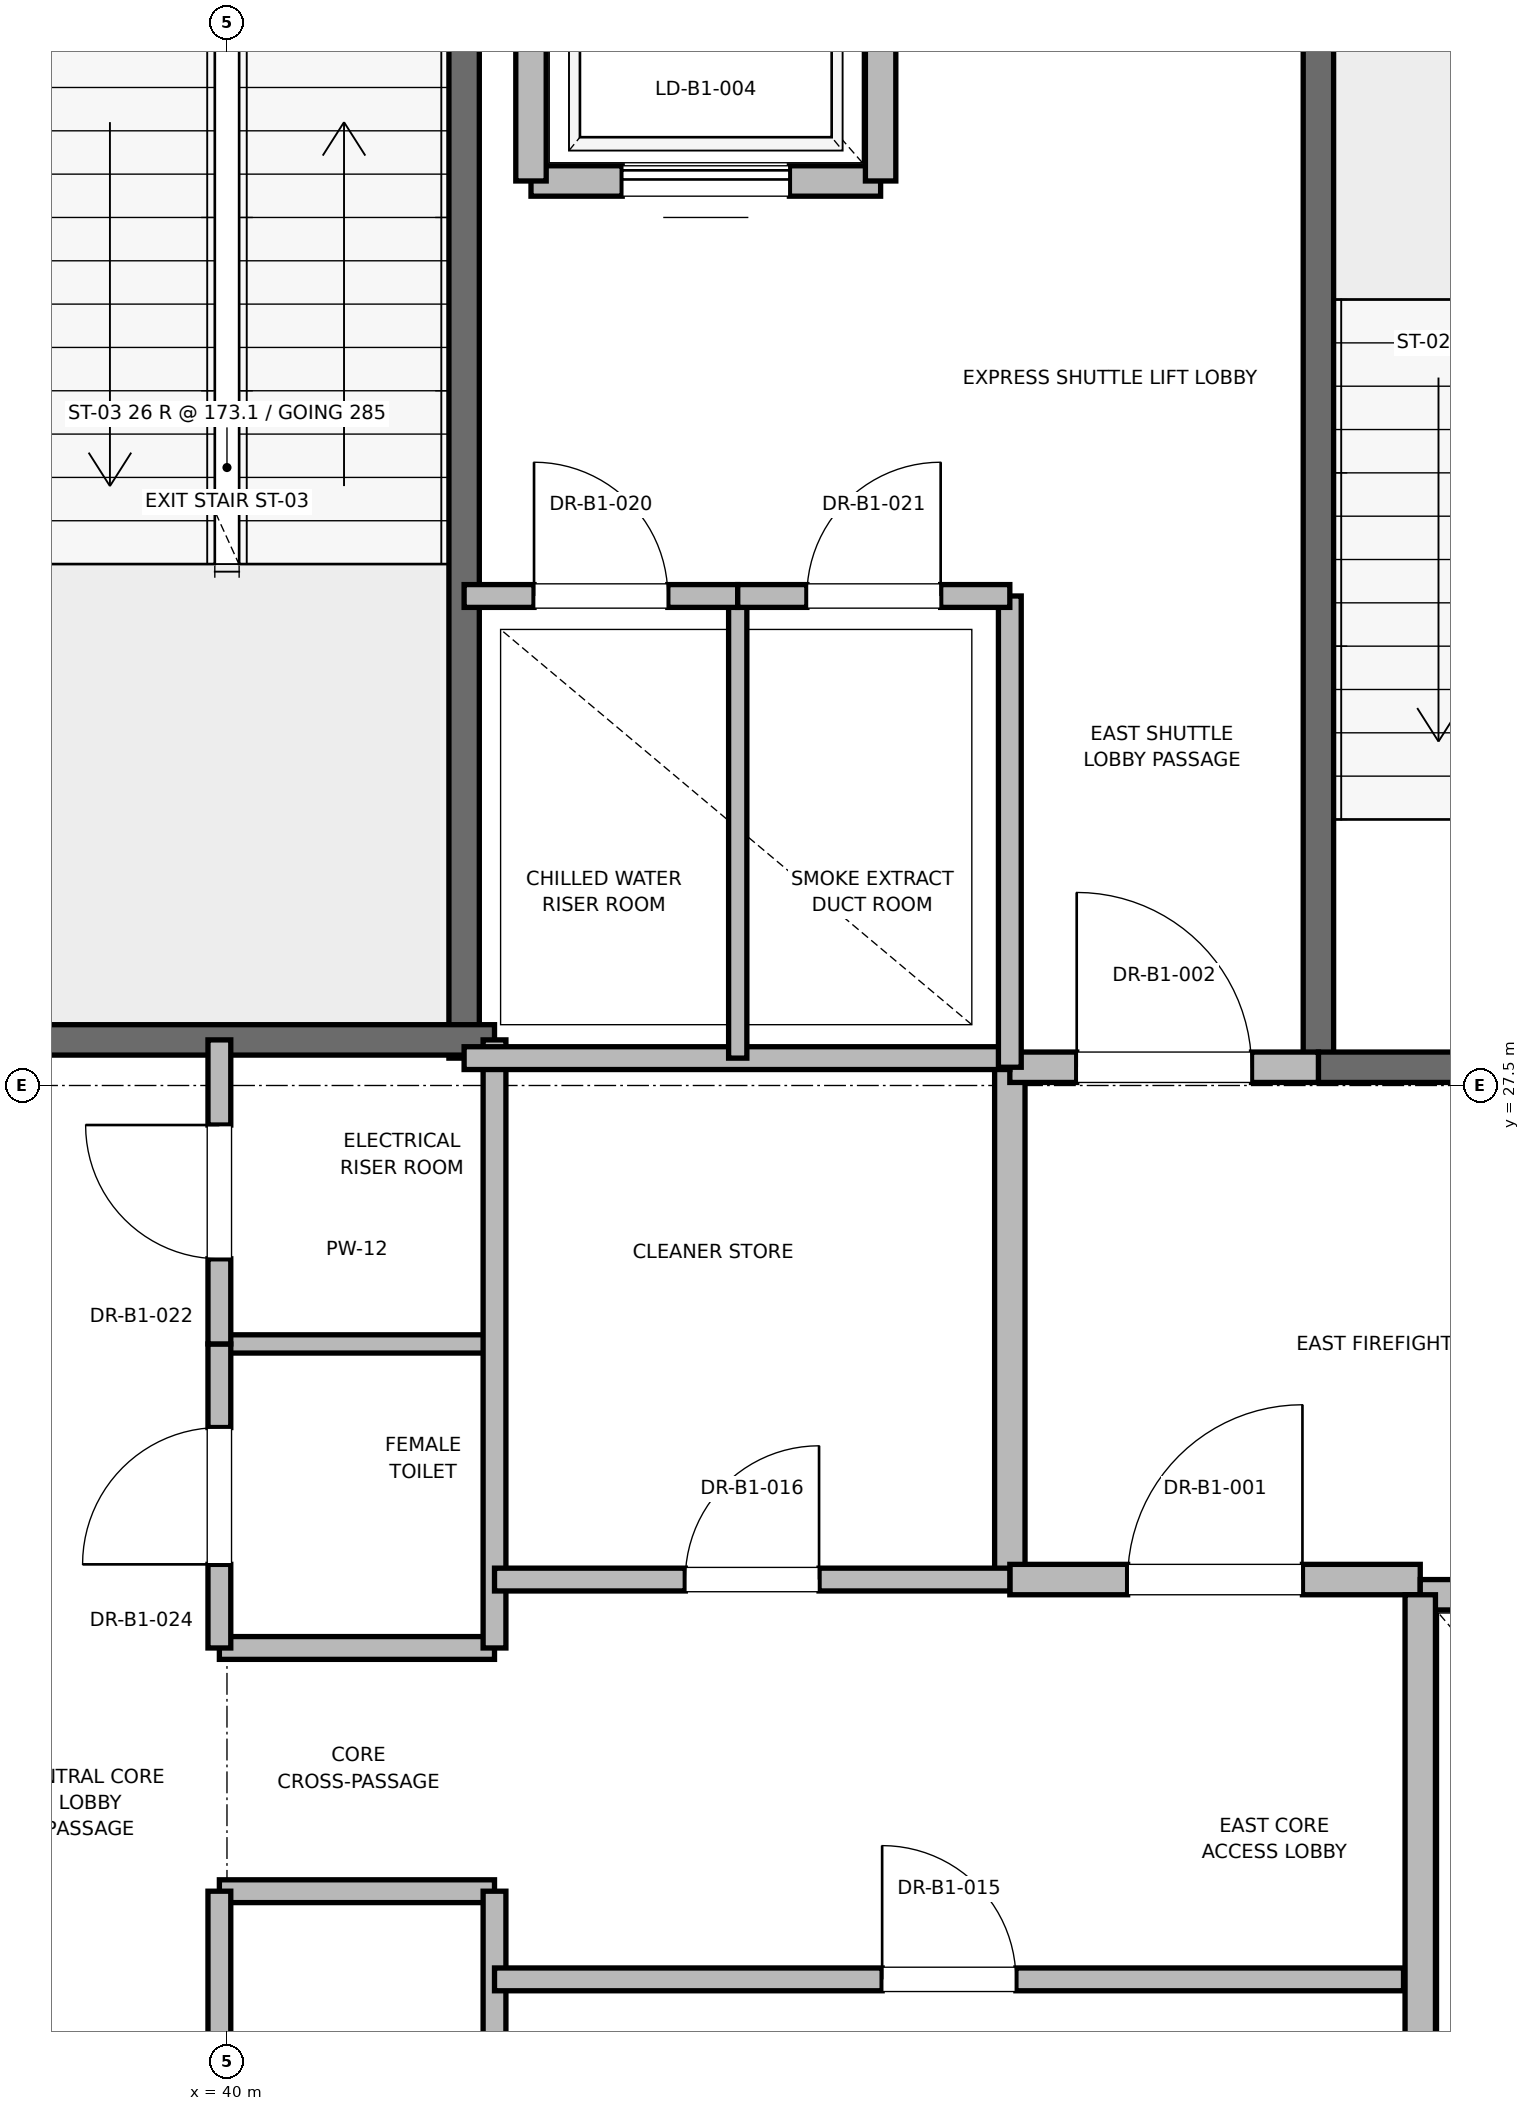
"""IFC4 building model, lengths in metres.
Left out: names, types, materials, properties, quantities, classifications, styles, units other than length and angle.
Written with IfcOpenShell. Run it as: python <this file> out.ifc"""

import sys

from ifc_helpers import new_model, si_unit, direction, frame, frame_2d, origin, place, context, subcontext, project, spatial, rectangle, extrude, element, fill, save


model = new_model("IFC4")
c1 = context("Model", 3, precision=1e-05, world=origin(), true_north=direction((0.0, 1.0)))
c2 = subcontext(c1, "Body", "Model", "MODEL_VIEW")
j1 = project(units=[si_unit("LENGTHUNIT", "METRE"), si_unit("PLANEANGLEUNIT", "RADIAN")], contexts=[c1])
p1 = place(None, origin())
s1 = spatial("IfcSite", under=j1, at=p1, CompositionType="ELEMENT")
p2 = place(p1, origin())
s2 = spatial("IfcBuilding", under=s1, at=p2, CompositionType="ELEMENT")
p3 = place(p2, frame((0.0, 0.0, -4.5)))
s3 = spatial("IfcBuildingStorey", under=s2, at=p3, CompositionType="ELEMENT", Elevation=-4.5)
p4 = place(p3, frame((47.18, 27.62, 0.0), z_axis=(0.0, 0.0, 1.0), x_axis=(0.0, 1.0, 0.0)))
e1 = element("IfcWall", 1, at=p4, inside=s3, PredefinedType="SOLIDWALL", context=c2, shape_type="SweptSolid", body=[
    extrude(rectangle(XDim=8.18, YDim=0.2, at=frame_2d((4.09, 0.0))), origin(), (0.0, 0.0, 1.0), 4.22),
])
p5 = place(p3, frame((47.18, 27.62, 0.0), z_axis=(0.0, 0.0, 1.0), x_axis=(1.0, 0.0, 0.0)))
e2 = element("IfcWall", 2, at=p5, inside=s3, PredefinedType="SOLIDWALL", context=c2, shape_type="SweptSolid", body=[
    extrude(rectangle(XDim=3.12, YDim=0.2, at=frame_2d((1.56, 0.0))), origin(), (0.0, 0.0, 1.0), 4.22),
])
p6 = place(p5, frame((1.01, 0.0, 0.0)))
e3 = element("IfcOpeningElement", 3, at=p6, cuts=e2, PredefinedType="OPENING", context=c2, shape_type="SweptSolid", body=[
    extrude(rectangle(XDim=1.1, YDim=2.15, at=frame_2d((0.55, 1.075))), frame((0.0, 0.1, 0.0), z_axis=(0.0, -1.0, 0.0), x_axis=(1.0, 0.0, 0.0)), (0.0, 0.0, 1.0), 0.2),
])
p7 = place(p3, frame((41.56, 27.68, 0.0), z_axis=(0.0, 0.0, 1.0), x_axis=(0.0, 1.0, 0.0)))
e4 = element("IfcWall", 4, at=p7, inside=s3, PredefinedType="SOLIDWALL", context=c2, shape_type="SweptSolid", body=[
    extrude(rectangle(XDim=8.57, YDim=0.2, at=frame_2d((4.285, 0.0))), origin(), (0.0, 0.0, 1.0), 4.22),
])
p8 = place(p3, frame((38.44, 27.8, 0.0), z_axis=(0.0, 0.0, 1.0), x_axis=(1.0, 0.0, 0.0)))
e5 = element("IfcWall", 5, at=p8, inside=s3, PredefinedType="SOLIDWALL", context=c2, shape_type="SweptSolid", body=[
    extrude(rectangle(XDim=3.32, YDim=0.2, at=frame_2d((1.66, 0.0))), origin(), (0.0, 0.0, 1.0), 4.22),
])
p9 = place(p3, frame((45.15, 24.25, 0.0), z_axis=(0.0, 0.0, 1.0), x_axis=(0.0, 1.0, 0.0)))
e6 = element("IfcWall", 6, at=p9, inside=s3, PredefinedType="PARTITIONING", context=c2, shape_type="SweptSolid", body=[
    extrude(rectangle(XDim=3.37, YDim=0.2, at=frame_2d((1.685, 0.0))), origin(), (0.0, 0.0, 1.0), 4.22),
])
p10 = place(p3, frame((45.15, 24.25, 0.0), z_axis=(0.0, 0.0, 1.0), x_axis=(1.0, 0.0, 0.0)))
e7 = element("IfcWall", 7, at=p10, inside=s3, PredefinedType="PARTITIONING", context=c2, shape_type="SweptSolid", body=[
    extrude(rectangle(XDim=2.7, YDim=0.2, at=frame_2d((1.35, 0.0))), origin(), (0.0, 0.0, 1.0), 4.22),
])
p11 = place(p10, frame((0.775, 0.0, 0.0)))
e8 = element("IfcOpeningElement", 8, at=p11, cuts=e7, PredefinedType="OPENING", context=c2, shape_type="SweptSolid", body=[
    extrude(rectangle(XDim=1.15, YDim=2.2, at=frame_2d((0.575, 1.1))), frame((0.0, 0.1, 0.0), z_axis=(0.0, -1.0, 0.0), x_axis=(1.0, 0.0, 0.0)), (0.0, 0.0, 1.0), 0.2),
])
p12 = place(p3, frame((45.15, 27.62, 0.0), z_axis=(0.0, 0.0, 1.0), x_axis=(1.0, 0.0, 0.0)))
e9 = element("IfcWall", 9, at=p12, inside=s3, PredefinedType="PARTITIONING", context=c2, shape_type="SweptSolid", body=[
    extrude(rectangle(XDim=2.03, YDim=0.2, at=frame_2d((1.015, 0.0))), origin(), (0.0, 0.0, 1.0), 4.22),
])
p13 = place(p12, frame((0.44, 0.0, 0.0)))
e10 = element("IfcOpeningElement", 10, at=p13, cuts=e9, PredefinedType="OPENING", context=c2, shape_type="SweptSolid", body=[
    extrude(rectangle(XDim=1.15, YDim=2.2, at=frame_2d((0.575, 1.1))), frame((0.0, 0.1, 0.0), z_axis=(0.0, -1.0, 0.0), x_axis=(1.0, 0.0, 0.0)), (0.0, 0.0, 1.0), 0.2),
])
p14 = place(p3, frame((50.45, 24.15, 0.0), z_axis=(0.0, 0.0, 1.0), x_axis=(-1.0, 0.0, 0.0)))
e11 = element("IfcWall", 11, at=p14, inside=s3, PredefinedType="SOLIDWALL", context=c2, shape_type="SweptSolid", body=[
    extrude(rectangle(XDim=2.6, YDim=0.2, at=frame_2d((1.3, 0.0))), origin(), (0.0, 0.0, 1.0), 3.0),
])
p15 = place(p14, frame((0.75, 0.0, 0.0)))
e12 = element("IfcOpeningElement", 12, at=p15, cuts=e11, PredefinedType="OPENING", context=c2, shape_type="SweptSolid", body=[
    extrude(rectangle(XDim=1.1, YDim=2.2, at=frame_2d((0.55, 1.1))), frame((0.0, 0.1, 0.0), z_axis=(0.0, -1.0, 0.0), x_axis=(1.0, 0.0, 0.0)), (0.0, 0.0, 1.0), 0.2),
])
p16 = place(p3, frame((47.85, 24.15, 0.0), z_axis=(0.0, 0.0, 1.0), x_axis=(0.0, -1.0, 0.0)))
e13 = element("IfcWall", 13, at=p16, inside=s3, PredefinedType="SOLIDWALL", context=c2, shape_type="SweptSolid", body=[
    extrude(rectangle(XDim=3.0, YDim=0.2, at=frame_2d((1.5, 0.0))), origin(), (0.0, 0.0, 1.0), 4.22),
])
p17 = place(p3, frame((42.0, 33.45, 0.0), z_axis=(0.0, 0.0, 1.0), x_axis=(1.0, 0.0, 0.0)))
e14 = element("IfcWall", 14, at=p17, inside=s3, PredefinedType="SOLIDWALL", context=c2, shape_type="SweptSolid", body=[
    extrude(rectangle(XDim=2.3, YDim=0.2, at=frame_2d((1.15, 0.0))), origin(), (0.0, 0.0, 1.0), 4.22),
])
p18 = place(p17, frame((0.6, 0.0, 0.0)))
e15 = element("IfcOpeningElement", 15, at=p18, cuts=e14, PredefinedType="OPENING", context=c2, shape_type="SweptSolid", body=[
    extrude(rectangle(XDim=1.1, YDim=2.2, at=frame_2d((0.55, 1.1))), frame((0.0, 0.1, 0.0), z_axis=(0.0, -1.0, 0.0), x_axis=(1.0, 0.0, 0.0)), (0.0, 0.0, 1.0), 0.2),
])
for number, where, z_axis, x_axis in (
    (16, (42.0, 36.05, 0.0), (0.0, 0.0, 1.0), (0.0, -1.0, 0.0)),
    (17, (44.3, 33.45, 0.0), (0.0, 0.0, 1.0), (0.0, 1.0, 0.0)),
):
    element("IfcWall", number, at=place(p3, frame(where, z_axis=z_axis, x_axis=x_axis)), inside=s3, PredefinedType="SOLIDWALL", context=c2, shape_type="SweptSolid", body=[
        extrude(rectangle(XDim=2.6, YDim=0.2, at=frame_2d((1.3, 0.0))), origin(), (0.0, 0.0, 1.0), 3.0),
    ])
for number, where, z_axis, x_axis in (
    (18, (39.95, 22.2, 0.0), (0.0, 0.0, 1.0), (1.0, 0.0, 0.0)),
    (19, (39.95, 23.8, 0.0), (0.0, 0.0, 1.0), (1.0, 0.0, 0.0)),
):
    element("IfcWall", number, at=place(p3, frame(where, z_axis=z_axis, x_axis=x_axis)), inside=s3, PredefinedType="PARTITIONING", context=c2, shape_type="SweptSolid", body=[
        extrude(rectangle(XDim=1.81, YDim=0.15, at=frame_2d((0.905, 0.0))), origin(), (0.0, 0.0, 1.0), 2.85),
    ])
p19 = place(p3, frame((39.95, 25.8, 0.0), z_axis=(0.0, 0.0, 1.0), x_axis=(1.0, 0.0, 0.0)))
e20 = element("IfcWall", 20, at=p19, inside=s3, PredefinedType="PARTITIONING", context=c2, shape_type="SweptSolid", body=[
    extrude(rectangle(XDim=1.81, YDim=0.12, at=frame_2d((0.905, 0.0))), origin(), (0.0, 0.0, 1.0), 2.85),
])
p20 = place(p3, frame((41.76, 18.6, 0.0), z_axis=(0.0, 0.0, 1.0), x_axis=(0.0, 1.0, 0.0)))
e21 = element("IfcWall", 21, at=p20, inside=s3, PredefinedType="PARTITIONING", context=c2, shape_type="SweptSolid", body=[
    extrude(rectangle(XDim=3.6, YDim=0.15, at=frame_2d((1.8, 0.0))), origin(), (0.0, 0.0, 1.0), 2.85),
])
p21 = place(p3, frame((41.76, 23.8, 0.0), z_axis=(0.0, 0.0, 1.0), x_axis=(0.0, 1.0, 0.0)))
e22 = element("IfcWall", 22, at=p21, inside=s3, PredefinedType="PARTITIONING", context=c2, shape_type="SweptSolid", body=[
    extrude(rectangle(XDim=4.0, YDim=0.15, at=frame_2d((2.0, 0.0))), origin(), (0.0, 0.0, 1.0), 2.85),
])
p22 = place(p3, frame((39.95, 19.2, 0.0), z_axis=(0.0, 0.0, 1.0), x_axis=(0.0, 1.0, 0.0)))
e23 = element("IfcWall", 23, at=p22, inside=s3, PredefinedType="PARTITIONING", context=c2, shape_type="SweptSolid", body=[
    extrude(rectangle(XDim=3.0, YDim=0.15, at=frame_2d((1.5, 0.0))), origin(), (0.0, 0.0, 1.0), 2.85),
])
p23 = place(p22, frame((1.05, 0.0, 0.0)))
e24 = element("IfcOpeningElement", 24, at=p23, cuts=e23, PredefinedType="OPENING", context=c2, shape_type="SweptSolid", body=[
    extrude(rectangle(XDim=0.9, YDim=2.1, at=frame_2d((0.45, 1.05))), frame((0.0, 0.075, 0.0), z_axis=(0.0, -1.0, 0.0), x_axis=(1.0, 0.0, 0.0)), (0.0, 0.0, 1.0), 0.15),
])
p24 = place(p3, frame((39.95, 23.8, 0.0), z_axis=(0.0, 0.0, 1.0), x_axis=(0.0, 1.0, 0.0)))
e25 = element("IfcWall", 25, at=p24, inside=s3, PredefinedType="PARTITIONING", context=c2, shape_type="SweptSolid", body=[
    extrude(rectangle(XDim=2.0, YDim=0.15, at=frame_2d((1.0, 0.0))), origin(), (0.0, 0.0, 1.0), 2.85),
])
p25 = place(p24, frame((0.55, 0.0, 0.0)))
e26 = element("IfcOpeningElement", 26, at=p25, cuts=e25, PredefinedType="OPENING", context=c2, shape_type="SweptSolid", body=[
    extrude(rectangle(XDim=0.9, YDim=2.1, at=frame_2d((0.45, 1.05))), frame((0.0, 0.075, 0.0), z_axis=(0.0, -1.0, 0.0), x_axis=(1.0, 0.0, 0.0)), (0.0, 0.0, 1.0), 0.15),
])
p26 = place(p3, frame((39.95, 25.8, 0.0), z_axis=(0.0, 0.0, 1.0), x_axis=(0.0, 1.0, 0.0)))
e27 = element("IfcWall", 27, at=p26, inside=s3, PredefinedType="PARTITIONING", context=c2, shape_type="SweptSolid", body=[
    extrude(rectangle(XDim=2.0, YDim=0.15, at=frame_2d((1.0, 0.0))), origin(), (0.0, 0.0, 1.0), 2.85),
])
p27 = place(p26, frame((0.56, 0.0, 0.0)))
e28 = element("IfcOpeningElement", 28, at=p27, cuts=e27, PredefinedType="OPENING", context=c2, shape_type="SweptSolid", body=[
    extrude(rectangle(XDim=0.88, YDim=2.1, at=frame_2d((0.44, 1.05))), frame((0.0, 0.075, 0.0), z_axis=(0.0, -1.0, 0.0), x_axis=(1.0, 0.0, 0.0)), (0.0, 0.0, 1.0), 0.15),
])
p28 = place(p3, frame((41.56, 27.68, 0.0), z_axis=(0.0, 0.0, 1.0), x_axis=(1.0, 0.0, 0.0)))
e29 = element("IfcWall", 29, at=p28, inside=s3, PredefinedType="PARTITIONING", context=c2, shape_type="SweptSolid", body=[
    extrude(rectangle(XDim=3.59, YDim=0.15, at=frame_2d((1.795, 0.0))), origin(), (0.0, 0.0, 1.0), 2.85),
])
p29 = place(p3, frame((41.76, 21.62, 0.0), z_axis=(0.0, 0.0, 1.0), x_axis=(1.0, 0.0, 0.0)))
e30 = element("IfcWall", 30, at=p29, inside=s3, PredefinedType="PARTITIONING", context=c2, shape_type="SweptSolid", body=[
    extrude(rectangle(XDim=5.98, YDim=0.15, at=frame_2d((2.99, 0.0))), origin(), (0.0, 0.0, 1.0), 2.85),
])
p30 = place(p29, frame((2.55, 0.0, 0.0)))
e31 = element("IfcOpeningElement", 31, at=p30, cuts=e30, PredefinedType="OPENING", context=c2, shape_type="SweptSolid", body=[
    extrude(rectangle(XDim=0.88, YDim=2.1, at=frame_2d((0.44, 1.05))), frame((0.0, 0.075, 0.0), z_axis=(0.0, -1.0, 0.0), x_axis=(1.0, 0.0, 0.0)), (0.0, 0.0, 1.0), 0.15),
])
p31 = place(p3, frame((41.76, 24.25, 0.0), z_axis=(0.0, 0.0, 1.0), x_axis=(1.0, 0.0, 0.0)))
e32 = element("IfcWall", 32, at=p31, inside=s3, PredefinedType="PARTITIONING", context=c2, shape_type="SweptSolid", body=[
    extrude(rectangle(XDim=3.39, YDim=0.15, at=frame_2d((1.695, 0.0))), origin(), (0.0, 0.0, 1.0), 2.85),
])
p32 = place(p31, frame((1.255, 0.0, 0.0)))
e33 = element("IfcOpeningElement", 33, at=p32, cuts=e32, PredefinedType="OPENING", context=c2, shape_type="SweptSolid", body=[
    extrude(rectangle(XDim=0.88, YDim=2.1, at=frame_2d((0.44, 1.05))), frame((0.0, 0.075, 0.0), z_axis=(0.0, -1.0, 0.0), x_axis=(1.0, 0.0, 0.0)), (0.0, 0.0, 1.0), 0.15),
])
p33 = place(p3, frame((45.15, 27.62, 0.0), z_axis=(0.0, 0.0, 1.0), x_axis=(0.0, 1.0, 0.0)))
e34 = element("IfcWall", 34, at=p33, inside=s3, PredefinedType="PARTITIONING", context=c2, shape_type="SweptSolid", body=[
    extrude(rectangle(XDim=3.1, YDim=0.15, at=frame_2d((1.55, 0.0))), origin(), (0.0, 0.0, 1.0), 2.85),
])
p34 = place(p3, frame((43.36, 27.68, 0.0), z_axis=(0.0, 0.0, 1.0), x_axis=(0.0, 1.0, 0.0)))
e35 = element("IfcWall", 35, at=p34, inside=s3, PredefinedType="PARTITIONING", context=c2, shape_type="SweptSolid", body=[
    extrude(rectangle(XDim=3.04, YDim=0.12, at=frame_2d((1.52, 0.0))), origin(), (0.0, 0.0, 1.0), 2.85),
])
p35 = place(p3, frame((41.56, 30.72, 0.0), z_axis=(0.0, 0.0, 1.0), x_axis=(1.0, 0.0, 0.0)))
e36 = element("IfcWall", 36, at=p35, inside=s3, PredefinedType="PARTITIONING", context=c2, shape_type="SweptSolid", body=[
    extrude(rectangle(XDim=1.8, YDim=0.15, at=frame_2d((0.9, 0.0))), origin(), (0.0, 0.0, 1.0), 2.85),
])
p36 = place(p35, frame((0.46, 0.0, 0.0)))
e37 = element("IfcOpeningElement", 37, at=p36, cuts=e36, PredefinedType="OPENING", context=c2, shape_type="SweptSolid", body=[
    extrude(rectangle(XDim=0.88, YDim=2.1, at=frame_2d((0.44, 1.05))), frame((0.0, 0.075, 0.0), z_axis=(0.0, -1.0, 0.0), x_axis=(1.0, 0.0, 0.0)), (0.0, 0.0, 1.0), 0.15),
])
p37 = place(p3, frame((43.36, 30.72, 0.0), z_axis=(0.0, 0.0, 1.0), x_axis=(1.0, 0.0, 0.0)))
e38 = element("IfcWall", 38, at=p37, inside=s3, PredefinedType="PARTITIONING", context=c2, shape_type="SweptSolid", body=[
    extrude(rectangle(XDim=1.79, YDim=0.15, at=frame_2d((0.895, 0.0))), origin(), (0.0, 0.0, 1.0), 2.85),
])
p38 = place(p37, frame((0.455, 0.0, 0.0)))
e39 = element("IfcOpeningElement", 39, at=p38, cuts=e38, PredefinedType="OPENING", context=c2, shape_type="SweptSolid", body=[
    extrude(rectangle(XDim=0.88, YDim=2.1, at=frame_2d((0.44, 1.05))), frame((0.0, 0.075, 0.0), z_axis=(0.0, -1.0, 0.0), x_axis=(1.0, 0.0, 0.0)), (0.0, 0.0, 1.0), 0.15),
])
p39 = place(p11, origin())
e40 = element("IfcDoor", 40, at=p39, inside=s3, OperationType="SINGLE_SWING_RIGHT", PredefinedType="DOOR", context=c2, shape_type="SweptSolid", body=[
    extrude(rectangle(XDim=1.15, YDim=2.2, at=frame_2d((0.575, 1.1))), frame((0.0, 0.025, 0.0), z_axis=(0.0, -1.0, 0.0), x_axis=(1.0, 0.0, 0.0)), (0.0, 0.0, 1.0), 0.05),
])
fill(e8, e40)
p40 = place(p13, origin())
e41 = element("IfcDoor", 41, at=p40, inside=s3, OperationType="SINGLE_SWING_LEFT", PredefinedType="DOOR", context=c2, shape_type="SweptSolid", body=[
    extrude(rectangle(XDim=1.15, YDim=2.2, at=frame_2d((0.575, 1.1))), frame((0.0, 0.025, 0.0), z_axis=(0.0, -1.0, 0.0), x_axis=(1.0, 0.0, 0.0)), (0.0, 0.0, 1.0), 0.05),
])
fill(e10, e41)
p41 = place(p18, origin())
e42 = element("IfcDoor", 42, at=p41, inside=s3, OperationType="SLIDING_TO_RIGHT", PredefinedType="DOOR", context=c2, shape_type="SweptSolid", body=[
    extrude(rectangle(XDim=1.1, YDim=2.2, at=frame_2d((0.55, 1.1))), frame((0.0, 0.025, 0.0), z_axis=(0.0, -1.0, 0.0), x_axis=(1.0, 0.0, 0.0)), (0.0, 0.0, 1.0), 0.05),
])
fill(e15, e42)
p42 = place(p25, origin())
e43 = element("IfcDoor", 43, at=p42, inside=s3, OperationType="SINGLE_SWING_LEFT", PredefinedType="DOOR", context=c2, shape_type="SweptSolid", body=[
    extrude(rectangle(XDim=0.9, YDim=2.1, at=frame_2d((0.45, 1.05))), frame((0.0, 0.025, 0.0), z_axis=(0.0, -1.0, 0.0), x_axis=(1.0, 0.0, 0.0)), (0.0, 0.0, 1.0), 0.05),
])
fill(e26, e43)
p43 = place(p27, origin())
e44 = element("IfcDoor", 44, at=p43, inside=s3, OperationType="SINGLE_SWING_RIGHT", PredefinedType="DOOR", context=c2, shape_type="SweptSolid", body=[
    extrude(rectangle(XDim=0.88, YDim=2.1, at=frame_2d((0.44, 1.05))), frame((0.0, 0.025, 0.0), z_axis=(0.0, -1.0, 0.0), x_axis=(1.0, 0.0, 0.0)), (0.0, 0.0, 1.0), 0.05),
])
fill(e28, e44)
p44 = place(p30, origin())
e45 = element("IfcDoor", 45, at=p44, inside=s3, OperationType="SINGLE_SWING_LEFT", PredefinedType="DOOR", context=c2, shape_type="SweptSolid", body=[
    extrude(rectangle(XDim=0.88, YDim=2.1, at=frame_2d((0.44, 1.05))), frame((0.0, 0.025, 0.0), z_axis=(0.0, -1.0, 0.0), x_axis=(1.0, 0.0, 0.0)), (0.0, 0.0, 1.0), 0.05),
])
fill(e31, e45)
p45 = place(p32, origin())
e46 = element("IfcDoor", 46, at=p45, inside=s3, OperationType="SINGLE_SWING_RIGHT", PredefinedType="DOOR", context=c2, shape_type="SweptSolid", body=[
    extrude(rectangle(XDim=0.88, YDim=2.1, at=frame_2d((0.44, 1.05))), frame((0.0, 0.025, 0.0), z_axis=(0.0, -1.0, 0.0), x_axis=(1.0, 0.0, 0.0)), (0.0, 0.0, 1.0), 0.05),
])
fill(e33, e46)
p46 = place(p36, origin())
e47 = element("IfcDoor", 47, at=p46, inside=s3, OperationType="SINGLE_SWING_LEFT", PredefinedType="DOOR", context=c2, shape_type="SweptSolid", body=[
    extrude(rectangle(XDim=0.88, YDim=2.1, at=frame_2d((0.44, 1.05))), frame((0.0, 0.025, 0.0), z_axis=(0.0, -1.0, 0.0), x_axis=(1.0, 0.0, 0.0)), (0.0, 0.0, 1.0), 0.05),
])
fill(e37, e47)
p47 = place(p38, origin())
e48 = element("IfcDoor", 48, at=p47, inside=s3, OperationType="SINGLE_SWING_RIGHT", PredefinedType="DOOR", context=c2, shape_type="SweptSolid", body=[
    extrude(rectangle(XDim=0.88, YDim=2.1, at=frame_2d((0.44, 1.05))), frame((0.0, 0.025, 0.0), z_axis=(0.0, -1.0, 0.0), x_axis=(1.0, 0.0, 0.0)), (0.0, 0.0, 1.0), 0.05),
])
fill(e39, e48)
save(model, sys.argv[1])
